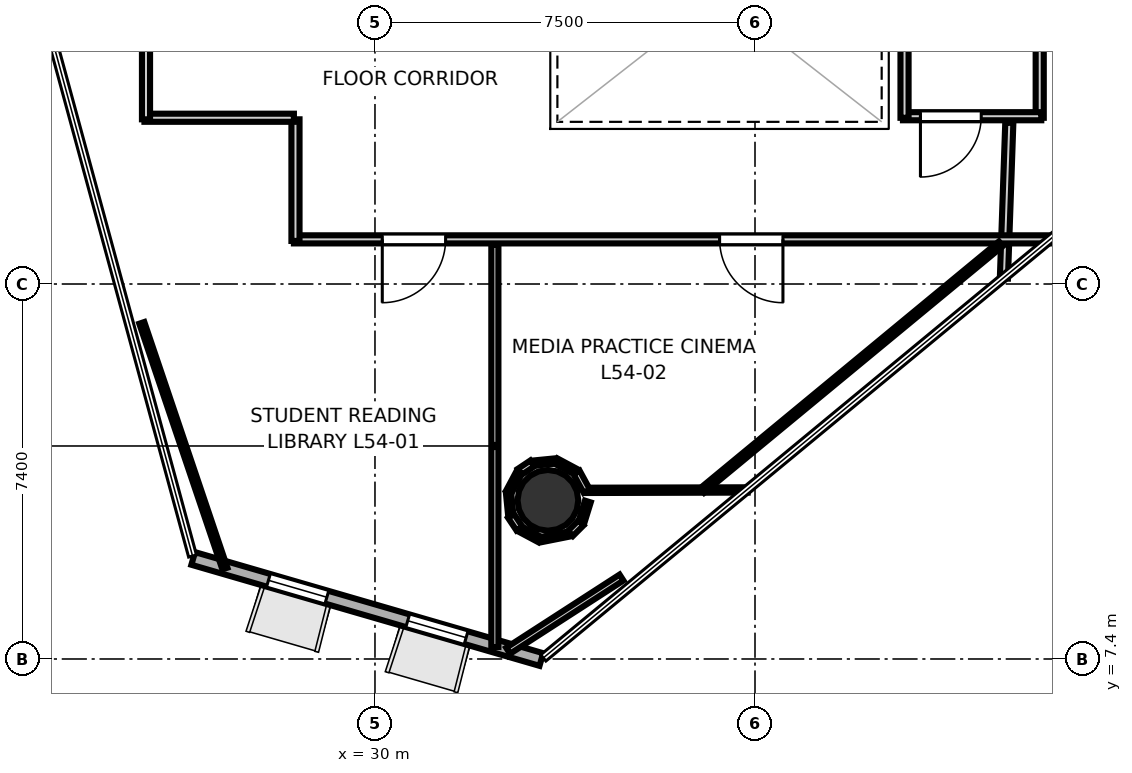
"""IFC4 building model, lengths in metres.
Left out: names, types, materials, properties, quantities, classifications, styles, units other than length and angle.
Written with IfcOpenShell. Run it as: python <this file> out.ifc"""

import sys

from ifc_helpers import new_model, si_unit, direction, frame, frame_2d, origin, origin_2d, place, context, subcontext, project, spatial, rectangle, hollow_circle, extrude, element, fill, save


model = new_model("IFC4")
c1 = context("Model", 3, precision=1e-05, world=origin(), true_north=direction((0.0, 1.0)))
c2 = subcontext(c1, "Body", "Model", "MODEL_VIEW")
j1 = project(units=[si_unit("LENGTHUNIT", "METRE"), si_unit("PLANEANGLEUNIT", "RADIAN")], contexts=[c1])
p1 = place(None, origin())
s1 = spatial("IfcSite", under=j1, at=p1, CompositionType="ELEMENT")
p2 = place(p1, origin())
s2 = spatial("IfcBuilding", under=s1, at=p2, CompositionType="ELEMENT")
p3 = place(p2, frame((0.0, 0.0, 211.4)))
s3 = spatial("IfcBuildingStorey", under=s2, at=p3, CompositionType="ELEMENT", Elevation=211.4)
p4 = place(p3, frame((33.413, 10.531, 0.0), z_axis=(0.0, 0.0, 1.0), x_axis=(1.0, 0.0, 0.0)))
e1 = element("IfcColumn", 1, at=p4, inside=s3, PredefinedType="COLUMN", context=c2, shape_type="SweptSolid", body=[
    extrude(hollow_circle(Radius=0.6, WallThickness=0.03, at=origin_2d()), origin(), (0.0, 0.0, 1.0), 3.7),
])
p5 = place(p3, frame((26.413, 9.384, 0.0), z_axis=(0.0, 0.0, 1.0), x_axis=(0.960357721162, -0.278770599964, 0.0)))
e2 = element("IfcWall", 2, at=p5, inside=s3, PredefinedType="SOLIDWALL", context=c2, shape_type="SweptSolid", body=[
    extrude(rectangle(XDim=7.154, YDim=0.26, at=frame_2d((3.577, 0.0))), origin(), (0.0, 0.0, 1.0), 3.52),
])
p6 = place(p5, frame((1.546, 0.0, 0.9)))
e3 = element("IfcOpeningElement", 3, at=p6, cuts=e2, PredefinedType="OPENING", context=c2, shape_type="SweptSolid", body=[
    extrude(rectangle(XDim=1.2, YDim=2.0, at=frame_2d((0.6, 1.0))), frame((0.0, 0.14, 0.0), z_axis=(0.0, -1.0, 0.0), x_axis=(1.0, 0.0, 0.0)), (0.0, 0.0, 1.0), 0.28),
])
p7 = place(p5, frame((4.408, 0.0, 0.9)))
e4 = element("IfcOpeningElement", 4, at=p7, cuts=e2, PredefinedType="OPENING", context=c2, shape_type="SweptSolid", body=[
    extrude(rectangle(XDim=1.2, YDim=2.0, at=frame_2d((0.6, 1.0))), frame((0.0, 0.14, 0.0), z_axis=(0.0, -1.0, 0.0), x_axis=(1.0, 0.0, 0.0)), (0.0, 0.0, 1.0), 0.28),
])
p8 = place(p3, frame((43.119, 22.05, 0.0), z_axis=(0.0, 0.0, 1.0), x_axis=(0.0, -1.0, 0.0)))
e5 = element("IfcWall", 5, at=p8, inside=s3, PredefinedType="PARTITIONING", context=c2, shape_type="SweptSolid", body=[
    extrude(rectangle(XDim=3.97, YDim=0.16, at=frame_2d((1.985, 0.0))), origin(), (0.0, 0.0, 1.0), 2.84),
])
p9 = place(p8, frame((1.535, 0.0, 0.0)))
e6 = element("IfcOpeningElement", 6, at=p9, cuts=e5, PredefinedType="OPENING", context=c2, shape_type="SweptSolid", body=[
    extrude(rectangle(XDim=0.9, YDim=2.1, at=frame_2d((0.45, 1.05))), frame((0.0, 0.09, 0.0), z_axis=(0.0, -1.0, 0.0), x_axis=(1.0, 0.0, 0.0)), (0.0, 0.0, 1.0), 0.18),
])
p10 = place(p3, frame((43.15, 18.111, 0.0), z_axis=(0.0, 0.0, 1.0), x_axis=(-1.0, 0.0, 0.0)))
e7 = element("IfcWall", 7, at=p10, inside=s3, PredefinedType="PARTITIONING", context=c2, shape_type="SweptSolid", body=[
    extrude(rectangle(XDim=2.73, YDim=0.16, at=frame_2d((1.365, 0.0))), origin(), (0.0, 0.0, 1.0), 2.84),
])
p11 = place(p10, frame((1.185, 0.0, 0.0)))
e8 = element("IfcOpeningElement", 8, at=p11, cuts=e7, PredefinedType="OPENING", context=c2, shape_type="SweptSolid", body=[
    extrude(rectangle(XDim=1.2, YDim=2.15, at=frame_2d((0.6, 1.075))), frame((0.0, 0.09, 0.0), z_axis=(0.0, -1.0, 0.0), x_axis=(1.0, 0.0, 0.0)), (0.0, 0.0, 1.0), 0.18),
])
p12 = place(p3, frame((40.451, 18.08, 0.0), z_axis=(0.0, 0.0, 1.0), x_axis=(0.0, 1.0, 0.0)))
e9 = element("IfcWall", 9, at=p12, inside=s3, PredefinedType="PARTITIONING", context=c2, shape_type="SweptSolid", body=[
    extrude(rectangle(XDim=3.32, YDim=0.16, at=frame_2d((1.66, 0.0))), origin(), (0.0, 0.0, 1.0), 2.84),
])
p13 = place(p3, frame((42.519, 17.981, 0.0), z_axis=(0.0, 0.0, 1.0), x_axis=(-0.034867127796, -0.999391956841, 0.0)))
e10 = element("IfcWall", 10, at=p13, inside=s3, PredefinedType="PARTITIONING", context=c2, shape_type="SweptSolid", body=[
    extrude(rectangle(XDim=3.074, YDim=0.16, at=frame_2d((1.537, 0.0))), origin(), (0.0, 0.0, 1.0), 2.84),
])
p14 = place(p3, frame((43.343, 15.681, 0.0), z_axis=(0.0, 0.0, 1.0), x_axis=(-1.0, 0.0, 0.0)))
e11 = element("IfcWall", 11, at=p14, inside=s3, PredefinedType="PARTITIONING", context=c2, shape_type="SweptSolid", body=[
    extrude(rectangle(XDim=14.943, YDim=0.16, at=frame_2d((7.472, 0.0))), origin(), (0.0, 0.0, 1.0), 2.84),
])
p15 = place(p14, frame((11.949, 0.0, 0.0)))
e12 = element("IfcOpeningElement", 12, at=p15, cuts=e11, PredefinedType="OPENING", context=c2, shape_type="SweptSolid", body=[
    extrude(rectangle(XDim=1.25, YDim=2.2, at=frame_2d((0.625, 1.1))), frame((0.0, 0.09, 0.0), z_axis=(0.0, -1.0, 0.0), x_axis=(1.0, 0.0, 0.0)), (0.0, 0.0, 1.0), 0.18),
])
p16 = place(p14, frame((5.292, 0.0, 0.0)))
e13 = element("IfcOpeningElement", 13, at=p16, cuts=e11, PredefinedType="OPENING", context=c2, shape_type="SweptSolid", body=[
    extrude(rectangle(XDim=1.25, YDim=2.2, at=frame_2d((0.625, 1.1))), frame((0.0, 0.09, 0.0), z_axis=(0.0, -1.0, 0.0), x_axis=(1.0, 0.0, 0.0)), (0.0, 0.0, 1.0), 0.18),
])
p17 = place(p3, frame((28.431, 15.65, 0.0), z_axis=(0.0, 0.0, 1.0), x_axis=(0.0, 1.0, 0.0)))
e14 = element("IfcWall", 14, at=p17, inside=s3, PredefinedType="PARTITIONING", context=c2, shape_type="SweptSolid", body=[
    extrude(rectangle(XDim=2.4, YDim=0.16, at=frame_2d((1.2, 0.0))), origin(), (0.0, 0.0, 1.0), 2.84),
])
p18 = place(p3, frame((28.4, 18.081, 0.0), z_axis=(0.0, 0.0, 1.0), x_axis=(-1.0, 0.0, 0.0)))
e15 = element("IfcWall", 15, at=p18, inside=s3, PredefinedType="PARTITIONING", context=c2, shape_type="SweptSolid", body=[
    extrude(rectangle(XDim=2.95, YDim=0.16, at=frame_2d((1.475, 0.0))), origin(), (0.0, 0.0, 1.0), 2.84),
])
p19 = place(p3, frame((25.481, 18.05, 0.0), z_axis=(0.0, 0.0, 1.0), x_axis=(0.0, 1.0, 0.0)))
e16 = element("IfcWall", 16, at=p19, inside=s3, PredefinedType="PARTITIONING", context=c2, shape_type="SweptSolid", body=[
    extrude(rectangle(XDim=18.219, YDim=0.16, at=frame_2d((9.109, 0.0))), origin(), (0.0, 0.0, 1.0), 2.84),
])
p20 = place(p19, frame((8.659, 0.0, 0.0)))
e17 = element("IfcOpeningElement", 17, at=p20, cuts=e16, PredefinedType="OPENING", context=c2, shape_type="SweptSolid", body=[
    extrude(rectangle(XDim=0.9, YDim=2.1, at=frame_2d((0.45, 1.05))), frame((0.0, 0.09, 0.0), z_axis=(0.0, -1.0, 0.0), x_axis=(1.0, 0.0, 0.0)), (0.0, 0.0, 1.0), 0.18),
])
p21 = place(p3, frame((32.366, 15.571, 0.0), z_axis=(0.0, 0.0, 1.0), x_axis=(0.0, -1.0, 0.0)))
e18 = element("IfcWall", 18, at=p21, inside=s3, PredefinedType="PARTITIONING", context=c2, shape_type="SweptSolid", body=[
    extrude(rectangle(XDim=7.935, YDim=0.14, at=frame_2d((3.968, 0.0))), origin(), (0.0, 0.0, 1.0), 2.84),
])
p22 = place(p3, frame((27.038, 9.185, 0.0), z_axis=(0.0, 0.0, 1.0), x_axis=(-0.320360444682, 0.947295722297, 0.0)))
e19 = element("IfcWall", 19, at=p22, inside=s3, PredefinedType="PARTITIONING", context=c2, shape_type="SweptSolid", body=[
    extrude(rectangle(XDim=5.118, YDim=0.105, at=frame_2d((2.559, 0.0))), origin(), (0.0, 0.0, 1.0), 2.84),
])
p23 = place(p3, frame((42.352, 15.594, 0.0), z_axis=(0.0, 0.0, 1.0), x_axis=(-0.77103880066, -0.636788165622, 0.0)))
e20 = element("IfcWall", 20, at=p23, inside=s3, PredefinedType="PARTITIONING", context=c2, shape_type="SweptSolid", body=[
    extrude(rectangle(XDim=7.643, YDim=0.12, at=frame_2d((3.822, 0.0))), origin(), (0.0, 0.0, 1.0), 2.84),
])
p24 = place(p3, frame((37.355, 10.736, 0.0), z_axis=(0.0, 0.0, 1.0), x_axis=(-0.999996835824, -0.002515619422, 0.0)))
e21 = element("IfcWall", 21, at=p24, inside=s3, PredefinedType="PARTITIONING", context=c2, shape_type="SweptSolid", body=[
    extrude(rectangle(XDim=3.203, YDim=0.105, at=frame_2d((1.601, 0.0))), origin(), (0.0, 0.0, 1.0), 2.84),
])
p25 = place(p3, frame((34.18, 10.712, 0.0), z_axis=(0.0, 0.0, 1.0), x_axis=(-0.47901386463, 0.877807335064, 0.0)))
e22 = element("IfcWall", 22, at=p25, inside=s3, PredefinedType="PARTITIONING", context=c2, shape_type="SweptSolid", body=[
    extrude(rectangle(XDim=0.423, YDim=0.14, at=frame_2d((0.211, 0.0))), origin(), (0.0, 0.0, 1.0), 2.84),
])
p26 = place(p3, frame((33.965, 11.096, 0.0), z_axis=(0.0, 0.0, 1.0), x_axis=(-0.881923737177, 0.471392110461, 0.0)))
e23 = element("IfcWall", 23, at=p26, inside=s3, PredefinedType="PARTITIONING", context=c2, shape_type="SweptSolid", body=[
    extrude(rectangle(XDim=0.441, YDim=0.12, at=frame_2d((0.221, 0.0))), origin(), (0.0, 0.0, 1.0), 2.84),
])
p27 = place(p3, frame((33.558, 11.307, 0.0), z_axis=(0.0, 0.0, 1.0), x_axis=(-0.995189452067, -0.097969150732, 0.0)))
e24 = element("IfcWall", 24, at=p27, inside=s3, PredefinedType="PARTITIONING", context=c2, shape_type="SweptSolid", body=[
    extrude(rectangle(XDim=0.441, YDim=0.105, at=frame_2d((0.221, 0.0))), origin(), (0.0, 0.0, 1.0), 2.84),
])
p28 = place(p3, frame((33.105, 11.259, 0.0), z_axis=(0.0, 0.0, 1.0), x_axis=(-0.831796804072, -0.55508024351, 0.0)))
e25 = element("IfcWall", 25, at=p28, inside=s3, PredefinedType="PARTITIONING", context=c2, shape_type="SweptSolid", body=[
    extrude(rectangle(XDim=0.296, YDim=0.14, at=frame_2d((0.148, 0.0))), origin(), (0.0, 0.0, 1.0), 2.84),
])
p29 = place(p3, frame((32.848, 11.083, 0.0), z_axis=(0.0, 0.0, 1.0), x_axis=(-0.471392110461, -0.881923737177, 0.0)))
e26 = element("IfcWall", 26, at=p29, inside=s3, PredefinedType="PARTITIONING", context=c2, shape_type="SweptSolid", body=[
    extrude(rectangle(XDim=0.441, YDim=0.12, at=frame_2d((0.221, 0.0))), origin(), (0.0, 0.0, 1.0), 2.84),
])
p30 = place(p3, frame((32.637, 10.676, 0.0), z_axis=(0.0, 0.0, 1.0), x_axis=(0.097915215421, -0.995194760129, 0.0)))
e27 = element("IfcWall", 27, at=p30, inside=s3, PredefinedType="PARTITIONING", context=c2, shape_type="SweptSolid", body=[
    extrude(rectangle(XDim=0.441, YDim=0.105, at=frame_2d((0.221, 0.0))), origin(), (0.0, 0.0, 1.0), 2.84),
])
p31 = place(p3, frame((32.685, 10.223, 0.0), z_axis=(0.0, 0.0, 1.0), x_axis=(0.555649663283, -0.831416533209, 0.0)))
e28 = element("IfcWall", 28, at=p31, inside=s3, PredefinedType="PARTITIONING", context=c2, shape_type="SweptSolid", body=[
    extrude(rectangle(XDim=0.297, YDim=0.14, at=frame_2d((0.148, 0.0))), origin(), (0.0, 0.0, 1.0), 2.84),
])
p32 = place(p3, frame((32.861, 9.966, 0.0), z_axis=(0.0, 0.0, 1.0), x_axis=(0.881800703138, -0.471622221641, 0.0)))
e29 = element("IfcWall", 29, at=p32, inside=s3, PredefinedType="PARTITIONING", context=c2, shape_type="SweptSolid", body=[
    extrude(rectangle(XDim=0.441, YDim=0.12, at=frame_2d((0.221, 0.0))), origin(), (0.0, 0.0, 1.0), 2.84),
])
p33 = place(p3, frame((33.271, 9.755, 0.0), z_axis=(0.0, 0.0, 1.0), x_axis=(0.980773892286, 0.195147565217, 0.0)))
e30 = element("IfcWall", 30, at=p33, inside=s3, PredefinedType="PARTITIONING", context=c2, shape_type="SweptSolid", body=[
    extrude(rectangle(XDim=0.582, YDim=0.105, at=frame_2d((0.291, 0.0))), origin(), (0.0, 0.0, 1.0), 2.84),
])
p34 = place(p3, frame((33.857, 9.877, 0.0), z_axis=(0.0, 0.0, 1.0), x_axis=(0.707106781187, 0.707106781187, 0.0)))
e31 = element("IfcWall", 31, at=p34, inside=s3, PredefinedType="PARTITIONING", context=c2, shape_type="SweptSolid", body=[
    extrude(rectangle(XDim=0.297, YDim=0.14, at=frame_2d((0.148, 0.0))), origin(), (0.0, 0.0, 1.0), 2.84),
])
p35 = place(p3, frame((34.074, 10.1, 0.0), z_axis=(0.0, 0.0, 1.0), x_axis=(0.296453112939, 0.955047408158, 0.0)))
e32 = element("IfcWall", 32, at=p35, inside=s3, PredefinedType="PARTITIONING", context=c2, shape_type="SweptSolid", body=[
    extrude(rectangle(XDim=0.427, YDim=0.12, at=frame_2d((0.214, 0.0))), origin(), (0.0, 0.0, 1.0), 2.84),
])
p36 = place(p3, frame((34.865, 9.007, 0.0), z_axis=(0.0, 0.0, 1.0), x_axis=(-0.840125531088, -0.542392009541, 0.0)))
e33 = element("IfcWall", 33, at=p36, inside=s3, PredefinedType="PARTITIONING", context=c2, shape_type="SweptSolid", body=[
    extrude(rectangle(XDim=2.663, YDim=0.14, at=frame_2d((1.332, 0.0))), origin(), (0.0, 0.0, 1.0), 2.84),
])
p37 = place(p11, origin())
e34 = element("IfcDoor", 34, at=p37, inside=s3, OperationType="SINGLE_SWING_RIGHT", PredefinedType="DOOR", context=c2, shape_type="SweptSolid", body=[
    extrude(rectangle(XDim=1.2, YDim=2.15, at=frame_2d((0.6, 1.075))), frame((0.0, 0.025, 0.0), z_axis=(0.0, -1.0, 0.0), x_axis=(1.0, 0.0, 0.0)), (0.0, 0.0, 1.0), 0.05),
])
fill(e8, e34)
p38 = place(p15, origin())
e35 = element("IfcDoor", 35, at=p38, inside=s3, OperationType="SINGLE_SWING_RIGHT", PredefinedType="DOOR", context=c2, shape_type="SweptSolid", body=[
    extrude(rectangle(XDim=1.25, YDim=2.2, at=frame_2d((0.625, 1.1))), frame((0.0, 0.025, 0.0), z_axis=(0.0, -1.0, 0.0), x_axis=(1.0, 0.0, 0.0)), (0.0, 0.0, 1.0), 0.05),
])
fill(e12, e35)
p39 = place(p16, origin())
e36 = element("IfcDoor", 36, at=p39, inside=s3, OperationType="SINGLE_SWING_LEFT", PredefinedType="DOOR", context=c2, shape_type="SweptSolid", body=[
    extrude(rectangle(XDim=1.25, YDim=2.2, at=frame_2d((0.625, 1.1))), frame((0.0, 0.025, 0.0), z_axis=(0.0, -1.0, 0.0), x_axis=(1.0, 0.0, 0.0)), (0.0, 0.0, 1.0), 0.05),
])
fill(e13, e36)
p40 = place(p6, origin())
e37 = element("IfcWindow", 37, at=p40, inside=s3, PartitioningType="SINGLE_PANEL", PredefinedType="WINDOW", context=c2, shape_type="SweptSolid", body=[
    extrude(rectangle(XDim=1.2, YDim=2.0, at=frame_2d((0.6, 1.0))), frame((0.0, 0.03, 0.0), z_axis=(0.0, -1.0, 0.0), x_axis=(1.0, 0.0, 0.0)), (0.0, 0.0, 1.0), 0.06),
])
fill(e3, e37)
p41 = place(p7, origin())
e38 = element("IfcWindow", 38, at=p41, inside=s3, PartitioningType="SINGLE_PANEL", PredefinedType="WINDOW", context=c2, shape_type="SweptSolid", body=[
    extrude(rectangle(XDim=1.2, YDim=2.0, at=frame_2d((0.6, 1.0))), frame((0.0, 0.03, 0.0), z_axis=(0.0, -1.0, 0.0), x_axis=(1.0, 0.0, 0.0)), (0.0, 0.0, 1.0), 0.06),
])
fill(e4, e38)
save(model, sys.argv[1])
